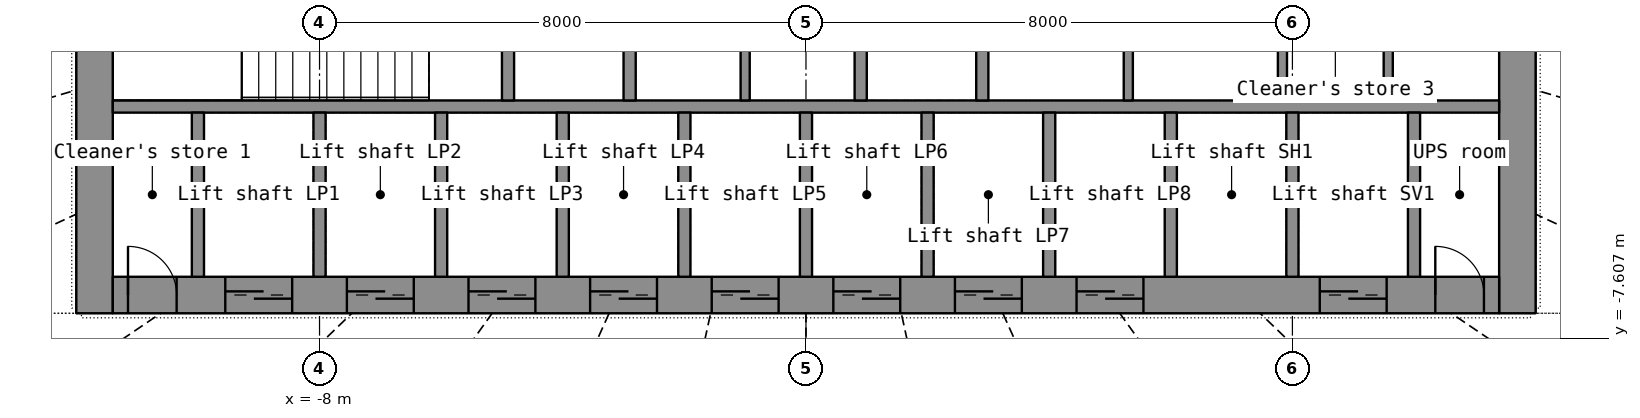
"""IFC4 building model, lengths in metres.
Left out: names, types, materials, properties, quantities, classifications, styles, units other than length and angle.
Written with IfcOpenShell. Run it as: python <this file> out.ifc"""

import sys

from ifc_helpers import new_model, si_unit, direction, frame, frame_2d, origin, place, context, subcontext, project, spatial, rectangle, extrude, element, fill, save


model = new_model("IFC4")
c1 = context("Model", 3, precision=1e-05, world=origin(), true_north=direction((0.0, 1.0)))
c2 = subcontext(c1, "Body", "Model", "MODEL_VIEW")
j1 = project(units=[si_unit("LENGTHUNIT", "METRE"), si_unit("PLANEANGLEUNIT", "RADIAN")], contexts=[c1])
p1 = place(None, origin())
s1 = spatial("IfcSite", under=j1, at=p1, CompositionType="ELEMENT")
p2 = place(p1, origin())
s2 = spatial("IfcBuilding", under=s1, at=p2, CompositionType="ELEMENT")
p3 = place(p2, frame((0.0, 0.0, 28.7)))
s3 = spatial("IfcBuildingStorey", under=s2, at=p3, CompositionType="ELEMENT", Elevation=28.7)
p4 = place(p3, frame((-11.7, -7.2, 0.0), z_axis=(0.0, 0.0, 1.0), x_axis=(0.0, 1.0, 0.0)))
e1 = element("IfcWall", 1, at=p4, inside=s3, PredefinedType="SHEAR", context=c2, shape_type="SweptSolid", body=[
    extrude(rectangle(XDim=14.4, YDim=0.6, at=frame_2d((7.2, 0.0))), origin(), (0.0, 0.0, 1.0), 3.8),
])
p5 = place(p4, frame((6.5, 0.0, 0.0)))
e2 = element("IfcOpeningElement", 2, at=p5, cuts=e1, PredefinedType="OPENING", context=c2, shape_type="SweptSolid", body=[
    extrude(rectangle(XDim=1.4, YDim=2.2, at=frame_2d((0.7, 1.1))), frame((0.0, 0.31, 0.0), z_axis=(0.0, -1.0, 0.0), x_axis=(1.0, 0.0, 0.0)), (0.0, 0.0, 1.0), 0.62),
])
p6 = place(p3, frame((11.7, -7.2, 0.0), z_axis=(0.0, 0.0, 1.0), x_axis=(0.0, 1.0, 0.0)))
e3 = element("IfcWall", 3, at=p6, inside=s3, PredefinedType="SHEAR", context=c2, shape_type="SweptSolid", body=[
    extrude(rectangle(XDim=14.4, YDim=0.6, at=frame_2d((7.2, 0.0))), origin(), (0.0, 0.0, 1.0), 3.8),
])
p7 = place(p6, frame((6.5, 0.0, 0.0)))
e4 = element("IfcOpeningElement", 4, at=p7, cuts=e3, PredefinedType="OPENING", context=c2, shape_type="SweptSolid", body=[
    extrude(rectangle(XDim=1.4, YDim=2.2, at=frame_2d((0.7, 1.1))), frame((0.0, 0.31, 0.0), z_axis=(0.0, -1.0, 0.0), x_axis=(1.0, 0.0, 0.0)), (0.0, 0.0, 1.0), 0.62),
])
p8 = place(p3, frame((-11.4, -6.9, 0.0), z_axis=(0.0, 0.0, 1.0), x_axis=(1.0, 0.0, 0.0)))
e5 = element("IfcWall", 5, at=p8, inside=s3, PredefinedType="SHEAR", context=c2, shape_type="SweptSolid", body=[
    extrude(rectangle(XDim=22.8, YDim=0.6, at=frame_2d((11.4, 0.0))), origin(), (0.0, 0.0, 1.0), 3.8),
])
p9 = place(p8, frame((1.85, 0.0, 0.0)))
e6 = element("IfcOpeningElement", 6, at=p9, cuts=e5, PredefinedType="OPENING", context=c2, shape_type="SweptSolid", body=[
    extrude(rectangle(XDim=1.1, YDim=2.2, at=frame_2d((0.55, 1.1))), frame((0.0, 0.31, 0.0), z_axis=(0.0, -1.0, 0.0), x_axis=(1.0, 0.0, 0.0)), (0.0, 0.0, 1.0), 0.62),
])
p10 = place(p8, frame((3.85, 0.0, 0.0)))
e7 = element("IfcOpeningElement", 7, at=p10, cuts=e5, PredefinedType="OPENING", context=c2, shape_type="SweptSolid", body=[
    extrude(rectangle(XDim=1.1, YDim=2.2, at=frame_2d((0.55, 1.1))), frame((0.0, 0.31, 0.0), z_axis=(0.0, -1.0, 0.0), x_axis=(1.0, 0.0, 0.0)), (0.0, 0.0, 1.0), 0.62),
])
p11 = place(p8, frame((5.85, 0.0, 0.0)))
e8 = element("IfcOpeningElement", 8, at=p11, cuts=e5, PredefinedType="OPENING", context=c2, shape_type="SweptSolid", body=[
    extrude(rectangle(XDim=1.1, YDim=2.2, at=frame_2d((0.55, 1.1))), frame((0.0, 0.31, 0.0), z_axis=(0.0, -1.0, 0.0), x_axis=(1.0, 0.0, 0.0)), (0.0, 0.0, 1.0), 0.62),
])
p12 = place(p8, frame((7.85, 0.0, 0.0)))
e9 = element("IfcOpeningElement", 9, at=p12, cuts=e5, PredefinedType="OPENING", context=c2, shape_type="SweptSolid", body=[
    extrude(rectangle(XDim=1.1, YDim=2.2, at=frame_2d((0.55, 1.1))), frame((0.0, 0.31, 0.0), z_axis=(0.0, -1.0, 0.0), x_axis=(1.0, 0.0, 0.0)), (0.0, 0.0, 1.0), 0.62),
])
p13 = place(p8, frame((9.85, 0.0, 0.0)))
e10 = element("IfcOpeningElement", 10, at=p13, cuts=e5, PredefinedType="OPENING", context=c2, shape_type="SweptSolid", body=[
    extrude(rectangle(XDim=1.1, YDim=2.2, at=frame_2d((0.55, 1.1))), frame((0.0, 0.31, 0.0), z_axis=(0.0, -1.0, 0.0), x_axis=(1.0, 0.0, 0.0)), (0.0, 0.0, 1.0), 0.62),
])
p14 = place(p8, frame((11.85, 0.0, 0.0)))
e11 = element("IfcOpeningElement", 11, at=p14, cuts=e5, PredefinedType="OPENING", context=c2, shape_type="SweptSolid", body=[
    extrude(rectangle(XDim=1.1, YDim=2.2, at=frame_2d((0.55, 1.1))), frame((0.0, 0.31, 0.0), z_axis=(0.0, -1.0, 0.0), x_axis=(1.0, 0.0, 0.0)), (0.0, 0.0, 1.0), 0.62),
])
p15 = place(p8, frame((13.85, 0.0, 0.0)))
e12 = element("IfcOpeningElement", 12, at=p15, cuts=e5, PredefinedType="OPENING", context=c2, shape_type="SweptSolid", body=[
    extrude(rectangle(XDim=1.1, YDim=2.2, at=frame_2d((0.55, 1.1))), frame((0.0, 0.31, 0.0), z_axis=(0.0, -1.0, 0.0), x_axis=(1.0, 0.0, 0.0)), (0.0, 0.0, 1.0), 0.62),
])
p16 = place(p8, frame((15.85, 0.0, 0.0)))
e13 = element("IfcOpeningElement", 13, at=p16, cuts=e5, PredefinedType="OPENING", context=c2, shape_type="SweptSolid", body=[
    extrude(rectangle(XDim=1.1, YDim=2.2, at=frame_2d((0.55, 1.1))), frame((0.0, 0.31, 0.0), z_axis=(0.0, -1.0, 0.0), x_axis=(1.0, 0.0, 0.0)), (0.0, 0.0, 1.0), 0.62),
])
p17 = place(p8, frame((19.85, 0.0, 0.0)))
e14 = element("IfcOpeningElement", 14, at=p17, cuts=e5, PredefinedType="OPENING", context=c2, shape_type="SweptSolid", body=[
    extrude(rectangle(XDim=1.1, YDim=2.2, at=frame_2d((0.55, 1.1))), frame((0.0, 0.31, 0.0), z_axis=(0.0, -1.0, 0.0), x_axis=(1.0, 0.0, 0.0)), (0.0, 0.0, 1.0), 0.62),
])
p18 = place(p8, frame((0.25, 0.0, 0.0)))
e15 = element("IfcOpeningElement", 15, at=p18, cuts=e5, PredefinedType="OPENING", context=c2, shape_type="SweptSolid", body=[
    extrude(rectangle(XDim=0.8, YDim=2.05, at=frame_2d((0.4, 1.025))), frame((0.0, 0.31, 0.0), z_axis=(0.0, -1.0, 0.0), x_axis=(1.0, 0.0, 0.0)), (0.0, 0.0, 1.0), 0.62),
])
p19 = place(p8, frame((21.75, 0.0, 0.0)))
e16 = element("IfcOpeningElement", 16, at=p19, cuts=e5, PredefinedType="OPENING", context=c2, shape_type="SweptSolid", body=[
    extrude(rectangle(XDim=0.8, YDim=2.05, at=frame_2d((0.4, 1.025))), frame((0.0, 0.31, 0.0), z_axis=(0.0, -1.0, 0.0), x_axis=(1.0, 0.0, 0.0)), (0.0, 0.0, 1.0), 0.62),
])
p20 = place(p3, frame((-11.4, -3.8, 0.0), z_axis=(0.0, 0.0, 1.0), x_axis=(1.0, 0.0, 0.0)))
e17 = element("IfcWall", 17, at=p20, inside=s3, PredefinedType="SHEAR", context=c2, shape_type="SweptSolid", body=[
    extrude(rectangle(XDim=22.8, YDim=0.2, at=frame_2d((11.4, 0.0))), origin(), (0.0, 0.0, 1.0), 3.8),
])
for number, where, z_axis, x_axis in (
    (18, (-10.0, -6.6, 0.0), (0.0, 0.0, 1.0), (0.0, 1.0, 0.0)),
    (19, (-8.0, -6.6, 0.0), (0.0, 0.0, 1.0), (0.0, 1.0, 0.0)),
    (20, (-6.0, -6.6, 0.0), (0.0, 0.0, 1.0), (0.0, 1.0, 0.0)),
    (21, (-4.0, -6.6, 0.0), (0.0, 0.0, 1.0), (0.0, 1.0, 0.0)),
    (22, (-2.0, -6.6, 0.0), (0.0, 0.0, 1.0), (0.0, 1.0, 0.0)),
    (23, (0.0, -6.6, 0.0), (0.0, 0.0, 1.0), (0.0, 1.0, 0.0)),
    (24, (2.0, -6.6, 0.0), (0.0, 0.0, 1.0), (0.0, 1.0, 0.0)),
    (25, (4.0, -6.6, 0.0), (0.0, 0.0, 1.0), (0.0, 1.0, 0.0)),
    (26, (6.0, -6.6, 0.0), (0.0, 0.0, 1.0), (0.0, 1.0, 0.0)),
    (27, (8.0, -6.6, 0.0), (0.0, 0.0, 1.0), (0.0, 1.0, 0.0)),
    (28, (10.0, -6.6, 0.0), (0.0, 0.0, 1.0), (0.0, 1.0, 0.0)),
):
    element("IfcWall", number, at=place(p3, frame(where, z_axis=z_axis, x_axis=x_axis)), inside=s3, PredefinedType="SHEAR", context=c2, shape_type="SweptSolid", body=[
        extrude(rectangle(XDim=2.7, YDim=0.2, at=frame_2d((1.35, 0.0))), origin(), (0.0, 0.0, 1.0), 3.8),
    ])
p21 = place(p3, frame((-2.9, -3.7, 0.0), z_axis=(0.0, 0.0, 1.0), x_axis=(0.0, 1.0, 0.0)))
e29 = element("IfcWall", 29, at=p21, inside=s3, PredefinedType="SHEAR", context=c2, shape_type="SweptSolid", body=[
    extrude(rectangle(XDim=7.4, YDim=0.2, at=frame_2d((3.7, 0.0))), origin(), (0.0, 0.0, 1.0), 3.8),
])
p22 = place(p21, frame((3.1, 0.0, 0.0)))
e30 = element("IfcOpeningElement", 30, at=p22, cuts=e29, PredefinedType="OPENING", context=c2, shape_type="SweptSolid", body=[
    extrude(rectangle(XDim=1.2, YDim=2.2, at=frame_2d((0.6, 1.1))), frame((0.0, 0.11, 0.0), z_axis=(0.0, -1.0, 0.0), x_axis=(1.0, 0.0, 0.0)), (0.0, 0.0, 1.0), 0.22),
])
p23 = place(p3, frame((2.9, -3.7, 0.0), z_axis=(0.0, 0.0, 1.0), x_axis=(0.0, 1.0, 0.0)))
e31 = element("IfcWall", 31, at=p23, inside=s3, PredefinedType="SHEAR", context=c2, shape_type="SweptSolid", body=[
    extrude(rectangle(XDim=7.4, YDim=0.2, at=frame_2d((3.7, 0.0))), origin(), (0.0, 0.0, 1.0), 3.8),
])
p24 = place(p23, frame((3.1, 0.0, 0.0)))
e32 = element("IfcOpeningElement", 32, at=p24, cuts=e31, PredefinedType="OPENING", context=c2, shape_type="SweptSolid", body=[
    extrude(rectangle(XDim=1.2, YDim=2.2, at=frame_2d((0.6, 1.1))), frame((0.0, 0.11, 0.0), z_axis=(0.0, -1.0, 0.0), x_axis=(1.0, 0.0, 0.0)), (0.0, 0.0, 1.0), 0.22),
])
for number, where, z_axis, x_axis in (
    (33, (0.9, -3.7, 0.0), (0.0, 0.0, 1.0), (0.0, 1.0, 0.0)),
    (34, (-4.9, -3.7, 0.0), (0.0, 0.0, 1.0), (0.0, 1.0, 0.0)),
):
    element("IfcWall", number, at=place(p3, frame(where, z_axis=z_axis, x_axis=x_axis)), inside=s3, PredefinedType="SHEAR", context=c2, shape_type="SweptSolid", body=[
        extrude(rectangle(XDim=2.35, YDim=0.2, at=frame_2d((1.175, 0.0))), origin(), (0.0, 0.0, 1.0), 3.8),
    ])
for number, where, z_axis, x_axis in (
    (35, (5.301, -3.7, 0.0), (0.0, 0.0, 1.0), (0.0, 1.0, 0.0)),
    (36, (7.836, -3.7, 0.0), (0.0, 0.0, 1.0), (0.0, 1.0, 0.0)),
    (37, (9.576, -3.7, 0.0), (0.0, 0.0, 1.0), (0.0, 1.0, 0.0)),
    (38, (-1.0, -3.7, 0.0), (0.0, 0.0, 1.0), (0.0, 1.0, 0.0)),
):
    element("IfcWall", number, at=place(p3, frame(where, z_axis=z_axis, x_axis=x_axis)), inside=s3, PredefinedType="PARTITIONING", context=c2, shape_type="SweptSolid", body=[
        extrude(rectangle(XDim=2.35, YDim=0.15, at=frame_2d((1.175, 0.0))), origin(), (0.0, 0.0, 1.0), 3.8),
    ])
p25 = place(p9, origin())
e39 = element("IfcDoor", 39, at=p25, inside=s3, OperationType="DOUBLE_DOOR_SLIDING", PredefinedType="DOOR", context=c2, shape_type="SweptSolid", body=[
    extrude(rectangle(XDim=1.1, YDim=2.2, at=frame_2d((0.55, 1.1))), frame((0.0, 0.025, 0.0), z_axis=(0.0, -1.0, 0.0), x_axis=(1.0, 0.0, 0.0)), (0.0, 0.0, 1.0), 0.05),
])
fill(e6, e39)
p26 = place(p10, origin())
e40 = element("IfcDoor", 40, at=p26, inside=s3, OperationType="DOUBLE_DOOR_SLIDING", PredefinedType="DOOR", context=c2, shape_type="SweptSolid", body=[
    extrude(rectangle(XDim=1.1, YDim=2.2, at=frame_2d((0.55, 1.1))), frame((0.0, 0.025, 0.0), z_axis=(0.0, -1.0, 0.0), x_axis=(1.0, 0.0, 0.0)), (0.0, 0.0, 1.0), 0.05),
])
fill(e7, e40)
p27 = place(p11, origin())
e41 = element("IfcDoor", 41, at=p27, inside=s3, OperationType="DOUBLE_DOOR_SLIDING", PredefinedType="DOOR", context=c2, shape_type="SweptSolid", body=[
    extrude(rectangle(XDim=1.1, YDim=2.2, at=frame_2d((0.55, 1.1))), frame((0.0, 0.025, 0.0), z_axis=(0.0, -1.0, 0.0), x_axis=(1.0, 0.0, 0.0)), (0.0, 0.0, 1.0), 0.05),
])
fill(e8, e41)
p28 = place(p12, origin())
e42 = element("IfcDoor", 42, at=p28, inside=s3, OperationType="DOUBLE_DOOR_SLIDING", PredefinedType="DOOR", context=c2, shape_type="SweptSolid", body=[
    extrude(rectangle(XDim=1.1, YDim=2.2, at=frame_2d((0.55, 1.1))), frame((0.0, 0.025, 0.0), z_axis=(0.0, -1.0, 0.0), x_axis=(1.0, 0.0, 0.0)), (0.0, 0.0, 1.0), 0.05),
])
fill(e9, e42)
p29 = place(p13, origin())
e43 = element("IfcDoor", 43, at=p29, inside=s3, OperationType="DOUBLE_DOOR_SLIDING", PredefinedType="DOOR", context=c2, shape_type="SweptSolid", body=[
    extrude(rectangle(XDim=1.1, YDim=2.2, at=frame_2d((0.55, 1.1))), frame((0.0, 0.025, 0.0), z_axis=(0.0, -1.0, 0.0), x_axis=(1.0, 0.0, 0.0)), (0.0, 0.0, 1.0), 0.05),
])
fill(e10, e43)
p30 = place(p14, origin())
e44 = element("IfcDoor", 44, at=p30, inside=s3, OperationType="DOUBLE_DOOR_SLIDING", PredefinedType="DOOR", context=c2, shape_type="SweptSolid", body=[
    extrude(rectangle(XDim=1.1, YDim=2.2, at=frame_2d((0.55, 1.1))), frame((0.0, 0.025, 0.0), z_axis=(0.0, -1.0, 0.0), x_axis=(1.0, 0.0, 0.0)), (0.0, 0.0, 1.0), 0.05),
])
fill(e11, e44)
p31 = place(p15, origin())
e45 = element("IfcDoor", 45, at=p31, inside=s3, OperationType="DOUBLE_DOOR_SLIDING", PredefinedType="DOOR", context=c2, shape_type="SweptSolid", body=[
    extrude(rectangle(XDim=1.1, YDim=2.2, at=frame_2d((0.55, 1.1))), frame((0.0, 0.025, 0.0), z_axis=(0.0, -1.0, 0.0), x_axis=(1.0, 0.0, 0.0)), (0.0, 0.0, 1.0), 0.05),
])
fill(e12, e45)
p32 = place(p16, origin())
e46 = element("IfcDoor", 46, at=p32, inside=s3, OperationType="DOUBLE_DOOR_SLIDING", PredefinedType="DOOR", context=c2, shape_type="SweptSolid", body=[
    extrude(rectangle(XDim=1.1, YDim=2.2, at=frame_2d((0.55, 1.1))), frame((0.0, 0.025, 0.0), z_axis=(0.0, -1.0, 0.0), x_axis=(1.0, 0.0, 0.0)), (0.0, 0.0, 1.0), 0.05),
])
fill(e13, e46)
p33 = place(p17, origin())
e47 = element("IfcDoor", 47, at=p33, inside=s3, OperationType="DOUBLE_DOOR_SLIDING", PredefinedType="DOOR", context=c2, shape_type="SweptSolid", body=[
    extrude(rectangle(XDim=1.1, YDim=2.2, at=frame_2d((0.55, 1.1))), frame((0.0, 0.025, 0.0), z_axis=(0.0, -1.0, 0.0), x_axis=(1.0, 0.0, 0.0)), (0.0, 0.0, 1.0), 0.05),
])
fill(e14, e47)
p34 = place(p18, origin())
e48 = element("IfcDoor", 48, at=p34, inside=s3, OperationType="SINGLE_SWING_LEFT", PredefinedType="DOOR", context=c2, shape_type="SweptSolid", body=[
    extrude(rectangle(XDim=0.8, YDim=2.05, at=frame_2d((0.4, 1.025))), frame((0.0, 0.025, 0.0), z_axis=(0.0, -1.0, 0.0), x_axis=(1.0, 0.0, 0.0)), (0.0, 0.0, 1.0), 0.05),
])
fill(e15, e48)
p35 = place(p19, origin())
e49 = element("IfcDoor", 49, at=p35, inside=s3, OperationType="SINGLE_SWING_LEFT", PredefinedType="DOOR", context=c2, shape_type="SweptSolid", body=[
    extrude(rectangle(XDim=0.8, YDim=2.05, at=frame_2d((0.4, 1.025))), frame((0.0, 0.025, 0.0), z_axis=(0.0, -1.0, 0.0), x_axis=(1.0, 0.0, 0.0)), (0.0, 0.0, 1.0), 0.05),
])
fill(e16, e49)
save(model, sys.argv[1])
